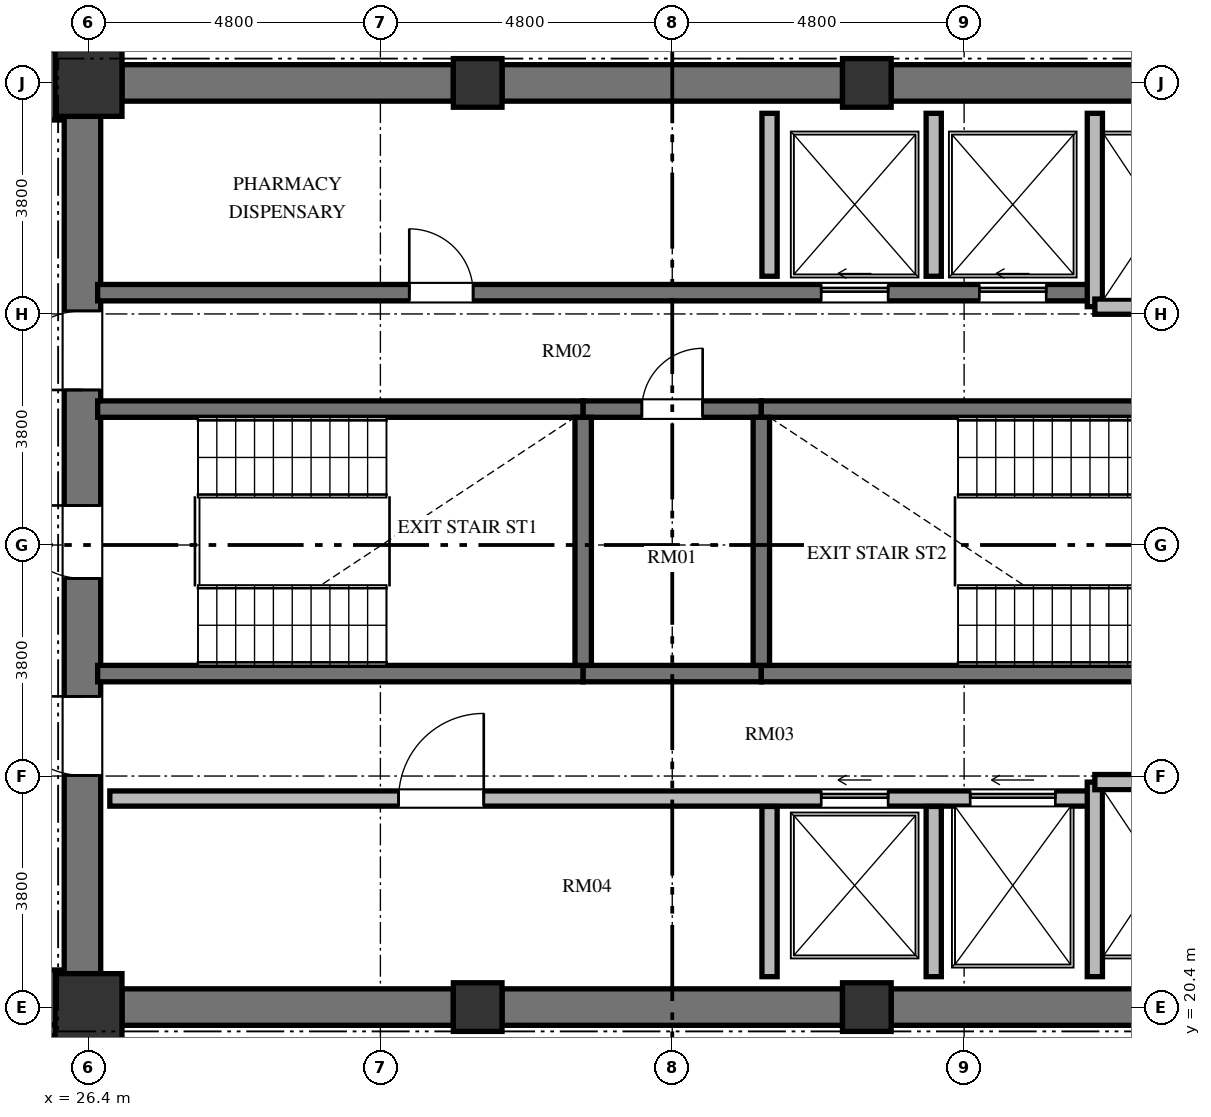
"""IFC4 building model, lengths in metres.
Left out: names, types, materials, properties, quantities, classifications, styles, units other than length and angle.
Written with IfcOpenShell. Run it as: python <this file> out.ifc"""

import sys

from ifc_helpers import new_model, si_unit, direction, frame, frame_2d, origin, origin_2d, place, context, subcontext, project, spatial, rectangle, extrude, element, fill, save


model = new_model("IFC4")
c1 = context("Model", 3, precision=1e-05, world=origin(), true_north=direction((0.0, 1.0)))
c2 = subcontext(c1, "Body", "Model", "MODEL_VIEW")
j1 = project(units=[si_unit("LENGTHUNIT", "METRE"), si_unit("PLANEANGLEUNIT", "RADIAN")], contexts=[c1])
p1 = place(None, origin())
s1 = spatial("IfcSite", under=j1, at=p1, CompositionType="ELEMENT")
p2 = place(p1, origin())
s2 = spatial("IfcBuilding", under=s1, at=p2, CompositionType="ELEMENT")
p3 = place(p2, frame((0.0, 0.0, 194.832)))
s3 = spatial("IfcBuildingStorey", under=s2, at=p3, CompositionType="ELEMENT", Elevation=194.832)
p4 = place(p3, frame((26.4, 20.4, 0.0), z_axis=(0.0, 0.0, 1.0), x_axis=(1.0, 0.0, 0.0)))
e1 = element("IfcColumn", 1, at=p4, inside=s3, PredefinedType="COLUMN", context=c2, shape_type="SweptSolid", body=[
    extrude(rectangle(XDim=1.1, YDim=1.1, at=origin_2d()), origin(), (0.0, 0.0, 1.0), 3.648),
])
for number, where, z_axis, x_axis in (
    (2, (32.8, 20.4, 0.0), (0.0, 0.0, 1.0), (1.0, 0.0, 0.0)),
    (3, (39.2, 20.4, 0.0), (0.0, 0.0, 1.0), (1.0, 0.0, 0.0)),
    (4, (39.2, 35.6, 0.0), (0.0, 0.0, 1.0), (1.0, 0.0, 0.0)),
    (5, (32.8, 35.6, 0.0), (0.0, 0.0, 1.0), (1.0, 0.0, 0.0)),
):
    element("IfcColumn", number, at=place(p3, frame(where, z_axis=z_axis, x_axis=x_axis)), inside=s3, PredefinedType="COLUMN", context=c2, shape_type="SweptSolid", body=[
        extrude(rectangle(XDim=0.8, YDim=0.8, at=origin_2d()), origin(), (0.0, 0.0, 1.0), 3.648),
    ])
p5 = place(p3, frame((26.4, 35.6, 0.0), z_axis=(0.0, 0.0, 1.0), x_axis=(1.0, 0.0, 0.0)))
e6 = element("IfcColumn", 6, at=p5, inside=s3, PredefinedType="COLUMN", context=c2, shape_type="SweptSolid", body=[
    extrude(rectangle(XDim=1.1, YDim=1.1, at=origin_2d()), origin(), (0.0, 0.0, 1.0), 3.648),
])
p6 = place(p3, frame((26.3, 20.95, 0.0), z_axis=(0.0, 0.0, 1.0), x_axis=(0.0, 1.0, 0.0)))
e7 = element("IfcWall", 7, at=p6, inside=s3, PredefinedType="SHEAR", context=c2, shape_type="SweptSolid", body=[
    extrude(rectangle(XDim=14.1, YDim=0.6, at=frame_2d((7.05, 0.0))), origin(), (0.0, 0.0, 1.0), 3.648),
])
p7 = place(p6, frame((6.5, 0.0, 0.0)))
e8 = element("IfcOpeningElement", 8, at=p7, cuts=e7, PredefinedType="OPENING", context=c2, shape_type="SweptSolid", body=[
    extrude(rectangle(XDim=1.2, YDim=2.15, at=frame_2d((0.6, 1.075))), frame((0.0, 0.31, 0.0), z_axis=(0.0, -1.0, 0.0), x_axis=(1.0, 0.0, 0.0)), (0.0, 0.0, 1.0), 0.62),
])
p8 = place(p6, frame((9.6, 0.0, 0.0)))
e9 = element("IfcOpeningElement", 9, at=p8, cuts=e7, PredefinedType="OPENING", context=c2, shape_type="SweptSolid", body=[
    extrude(rectangle(XDim=1.3, YDim=2.2, at=frame_2d((0.65, 1.1))), frame((0.0, 0.31, 0.0), z_axis=(0.0, -1.0, 0.0), x_axis=(1.0, 0.0, 0.0)), (0.0, 0.0, 1.0), 0.62),
])
p9 = place(p6, frame((3.26, 0.0, 0.0)))
e10 = element("IfcOpeningElement", 10, at=p9, cuts=e7, PredefinedType="OPENING", context=c2, shape_type="SweptSolid", body=[
    extrude(rectangle(XDim=1.3, YDim=2.2, at=frame_2d((0.65, 1.1))), frame((0.0, 0.31, 0.0), z_axis=(0.0, -1.0, 0.0), x_axis=(1.0, 0.0, 0.0)), (0.0, 0.0, 1.0), 0.62),
])
for number, where, z_axis, x_axis in (
    (11, (26.95, 20.4, 0.0), (0.0, 0.0, 1.0), (1.0, 0.0, 0.0)),
    (12, (26.95, 35.6, 0.0), (0.0, 0.0, 1.0), (1.0, 0.0, 0.0)),
):
    element("IfcWall", number, at=place(p3, frame(where, z_axis=z_axis, x_axis=x_axis)), inside=s3, PredefinedType="SHEAR", context=c2, shape_type="SweptSolid", body=[
        extrude(rectangle(XDim=5.45, YDim=0.6, at=frame_2d((2.725, 0.0))), origin(), (0.0, 0.0, 1.0), 3.648),
    ])
for number, where, z_axis, x_axis in (
    (13, (33.2, 20.4, 0.0), (0.0, 0.0, 1.0), (1.0, 0.0, 0.0)),
    (14, (33.2, 35.6, 0.0), (0.0, 0.0, 1.0), (1.0, 0.0, 0.0)),
):
    element("IfcWall", number, at=place(p3, frame(where, z_axis=z_axis, x_axis=x_axis)), inside=s3, PredefinedType="SHEAR", context=c2, shape_type="SweptSolid", body=[
        extrude(rectangle(XDim=5.6, YDim=0.6, at=frame_2d((2.8, 0.0))), origin(), (0.0, 0.0, 1.0), 3.648),
    ])
for number, where, z_axis, x_axis in (
    (15, (39.6, 20.4, 0.0), (0.0, 0.0, 1.0), (1.0, 0.0, 0.0)),
    (16, (39.6, 35.6, 0.0), (0.0, 0.0, 1.0), (1.0, 0.0, 0.0)),
):
    element("IfcWall", number, at=place(p3, frame(where, z_axis=z_axis, x_axis=x_axis)), inside=s3, PredefinedType="SHEAR", context=c2, shape_type="SweptSolid", body=[
        extrude(rectangle(XDim=5.45, YDim=0.6, at=frame_2d((2.725, 0.0))), origin(), (0.0, 0.0, 1.0), 3.648),
    ])
p10 = place(p3, frame((26.55, 30.235, 0.0), z_axis=(0.0, 0.0, 1.0), x_axis=(1.0, 0.0, 0.0)))
e17 = element("IfcWall", 17, at=p10, inside=s3, PredefinedType="SHEAR", context=c2, shape_type="SweptSolid", body=[
    extrude(rectangle(XDim=7.985, YDim=0.27, at=frame_2d((3.992, 0.0))), origin(), (0.0, 0.0, 1.0), 3.648),
])
p11 = place(p3, frame((34.535, 30.235, 0.0), z_axis=(0.0, 0.0, 1.0), x_axis=(1.0, 0.0, 0.0)))
e18 = element("IfcWall", 18, at=p11, inside=s3, PredefinedType="SHEAR", context=c2, shape_type="SweptSolid", body=[
    extrude(rectangle(XDim=2.93, YDim=0.27, at=frame_2d((1.465, 0.0))), origin(), (0.0, 0.0, 1.0), 3.648),
])
p12 = place(p11, frame((0.965, 0.0, 0.0)))
e19 = element("IfcOpeningElement", 19, at=p12, cuts=e18, PredefinedType="OPENING", context=c2, shape_type="SweptSolid", body=[
    extrude(rectangle(XDim=1.0, YDim=2.1, at=frame_2d((0.5, 1.05))), frame((0.0, 0.145, 0.0), z_axis=(0.0, -1.0, 0.0), x_axis=(1.0, 0.0, 0.0)), (0.0, 0.0, 1.0), 0.29),
])
p13 = place(p3, frame((37.465, 30.235, 0.0), z_axis=(0.0, 0.0, 1.0), x_axis=(1.0, 0.0, 0.0)))
e20 = element("IfcWall", 20, at=p13, inside=s3, PredefinedType="SHEAR", context=c2, shape_type="SweptSolid", body=[
    extrude(rectangle(XDim=7.985, YDim=0.27, at=frame_2d((3.992, 0.0))), origin(), (0.0, 0.0, 1.0), 3.648),
])
p14 = place(p13, frame((6.455, 0.0, 0.0)))
e21 = element("IfcOpeningElement", 21, at=p14, cuts=e20, PredefinedType="OPENING", context=c2, shape_type="SweptSolid", body=[
    extrude(rectangle(XDim=1.2, YDim=2.15, at=frame_2d((0.6, 1.075))), frame((0.0, 0.145, 0.0), z_axis=(0.0, -1.0, 0.0), x_axis=(1.0, 0.0, 0.0)), (0.0, 0.0, 1.0), 0.29),
])
p15 = place(p3, frame((26.55, 25.885, 0.0), z_axis=(0.0, 0.0, 1.0), x_axis=(1.0, 0.0, 0.0)))
e22 = element("IfcWall", 22, at=p15, inside=s3, PredefinedType="SHEAR", context=c2, shape_type="SweptSolid", body=[
    extrude(rectangle(XDim=7.985, YDim=0.27, at=frame_2d((3.992, 0.0))), origin(), (0.0, 0.0, 1.0), 3.648),
])
p16 = place(p3, frame((34.535, 25.885, 0.0), z_axis=(0.0, 0.0, 1.0), x_axis=(1.0, 0.0, 0.0)))
e23 = element("IfcWall", 23, at=p16, inside=s3, PredefinedType="SHEAR", context=c2, shape_type="SweptSolid", body=[
    extrude(rectangle(XDim=2.93, YDim=0.27, at=frame_2d((1.465, 0.0))), origin(), (0.0, 0.0, 1.0), 3.648),
])
p17 = place(p3, frame((37.465, 25.885, 0.0), z_axis=(0.0, 0.0, 1.0), x_axis=(1.0, 0.0, 0.0)))
e24 = element("IfcWall", 24, at=p17, inside=s3, PredefinedType="SHEAR", context=c2, shape_type="SweptSolid", body=[
    extrude(rectangle(XDim=7.985, YDim=0.27, at=frame_2d((3.992, 0.0))), origin(), (0.0, 0.0, 1.0), 3.648),
])
for number, where, z_axis, x_axis in (
    (25, (34.535, 26.02, 0.0), (0.0, 0.0, 1.0), (0.0, 1.0, 0.0)),
    (26, (37.465, 26.02, 0.0), (0.0, 0.0, 1.0), (0.0, 1.0, 0.0)),
):
    element("IfcWall", number, at=place(p3, frame(where, z_axis=z_axis, x_axis=x_axis)), inside=s3, PredefinedType="SHEAR", context=c2, shape_type="SweptSolid", body=[
        extrude(rectangle(XDim=4.08, YDim=0.27, at=frame_2d((2.04, 0.0))), origin(), (0.0, 0.0, 1.0), 3.648),
    ])
p18 = place(p3, frame((26.55, 32.15, 0.0), z_axis=(0.0, 0.0, 1.0), x_axis=(1.0, 0.0, 0.0)))
e27 = element("IfcWall", 27, at=p18, inside=s3, PredefinedType="SHEAR", context=c2, shape_type="SweptSolid", body=[
    extrude(rectangle(XDim=16.4, YDim=0.27, at=frame_2d((8.2, 0.0))), origin(), (0.0, 0.0, 1.0), 3.648),
])
p19 = place(p18, frame((5.125, 0.0, 0.0)))
e28 = element("IfcOpeningElement", 28, at=p19, cuts=e27, PredefinedType="OPENING", context=c2, shape_type="SweptSolid", body=[
    extrude(rectangle(XDim=1.05, YDim=2.15, at=frame_2d((0.525, 1.075))), frame((0.0, 0.145, 0.0), z_axis=(0.0, -1.0, 0.0), x_axis=(1.0, 0.0, 0.0)), (0.0, 0.0, 1.0), 0.29),
])
p20 = place(p18, frame((11.9, 0.0, 0.0)))
e29 = element("IfcOpeningElement", 29, at=p20, cuts=e27, PredefinedType="OPENING", context=c2, shape_type="SweptSolid", body=[
    extrude(rectangle(XDim=1.1, YDim=2.2, at=frame_2d((0.55, 1.1))), frame((0.0, 0.145, 0.0), z_axis=(0.0, -1.0, 0.0), x_axis=(1.0, 0.0, 0.0)), (0.0, 0.0, 1.0), 0.29),
])
p21 = place(p18, frame((14.5, 0.0, 0.0)))
e30 = element("IfcOpeningElement", 30, at=p21, cuts=e27, PredefinedType="OPENING", context=c2, shape_type="SweptSolid", body=[
    extrude(rectangle(XDim=1.1, YDim=2.2, at=frame_2d((0.55, 1.1))), frame((0.0, 0.145, 0.0), z_axis=(0.0, -1.0, 0.0), x_axis=(1.0, 0.0, 0.0)), (0.0, 0.0, 1.0), 0.29),
])
p22 = place(p3, frame((26.75, 23.83, 0.0), z_axis=(0.0, 0.0, 1.0), x_axis=(1.0, 0.0, 0.0)))
e31 = element("IfcWall", 31, at=p22, inside=s3, PredefinedType="SOLIDWALL", context=c2, shape_type="SweptSolid", body=[
    extrude(rectangle(XDim=16.2, YDim=0.25, at=frame_2d((8.1, 0.0))), origin(), (0.0, 0.0, 1.0), 3.448),
])
p23 = place(p22, frame((4.75, 0.0, 0.0)))
e32 = element("IfcOpeningElement", 32, at=p23, cuts=e31, PredefinedType="OPENING", context=c2, shape_type="SweptSolid", body=[
    extrude(rectangle(XDim=1.4, YDim=2.2, at=frame_2d((0.7, 1.1))), frame((0.0, 0.135, 0.0), z_axis=(0.0, -1.0, 0.0), x_axis=(1.0, 0.0, 0.0)), (0.0, 0.0, 1.0), 0.27),
])
p24 = place(p22, frame((11.7, 0.0, 0.0)))
e33 = element("IfcOpeningElement", 33, at=p24, cuts=e31, PredefinedType="OPENING", context=c2, shape_type="SweptSolid", body=[
    extrude(rectangle(XDim=1.1, YDim=2.2, at=frame_2d((0.55, 1.1))), frame((0.0, 0.135, 0.0), z_axis=(0.0, -1.0, 0.0), x_axis=(1.0, 0.0, 0.0)), (0.0, 0.0, 1.0), 0.27),
])
p25 = place(p22, frame((14.15, 0.0, 0.0)))
e34 = element("IfcOpeningElement", 34, at=p25, cuts=e31, PredefinedType="OPENING", context=c2, shape_type="SweptSolid", body=[
    extrude(rectangle(XDim=1.4, YDim=2.3, at=frame_2d((0.7, 1.15))), frame((0.0, 0.135, 0.0), z_axis=(0.0, -1.0, 0.0), x_axis=(1.0, 0.0, 0.0)), (0.0, 0.0, 1.0), 0.27),
])
p26 = place(p3, frame((42.95, 31.92, 0.0), z_axis=(0.0, 0.0, 1.0), x_axis=(0.0, 1.0, 0.0)))
e35 = element("IfcWall", 35, at=p26, inside=s3, PredefinedType="SOLIDWALL", context=c2, shape_type="SweptSolid", body=[
    extrude(rectangle(XDim=3.18, YDim=0.25, at=frame_2d((1.59, 0.0))), origin(), (0.0, 0.0, 1.0), 3.448),
])
p27 = place(p3, frame((42.95, 31.92, 0.0), z_axis=(0.0, 0.0, 1.0), x_axis=(1.0, 0.0, 0.0)))
e36 = element("IfcWall", 36, at=p27, inside=s3, PredefinedType="SOLIDWALL", context=c2, shape_type="SweptSolid", body=[
    extrude(rectangle(XDim=2.3, YDim=0.25, at=frame_2d((1.15, 0.0))), origin(), (0.0, 0.0, 1.0), 3.448),
])
p28 = place(p3, frame((42.95, 20.9, 0.0), z_axis=(0.0, 0.0, 1.0), x_axis=(0.0, 1.0, 0.0)))
e37 = element("IfcWall", 37, at=p28, inside=s3, PredefinedType="SOLIDWALL", context=c2, shape_type="SweptSolid", body=[
    extrude(rectangle(XDim=3.2, YDim=0.25, at=frame_2d((1.6, 0.0))), origin(), (0.0, 0.0, 1.0), 3.448),
])
p29 = place(p3, frame((42.95, 24.1, 0.0), z_axis=(0.0, 0.0, 1.0), x_axis=(1.0, 0.0, 0.0)))
e38 = element("IfcWall", 38, at=p29, inside=s3, PredefinedType="SOLIDWALL", context=c2, shape_type="SweptSolid", body=[
    extrude(rectangle(XDim=2.3, YDim=0.25, at=frame_2d((1.15, 0.0))), origin(), (0.0, 0.0, 1.0), 3.448),
])
p30 = place(p3, frame((37.6, 32.42, 0.0), z_axis=(0.0, 0.0, 1.0), x_axis=(0.0, 1.0, 0.0)))
e39 = element("IfcWall", 39, at=p30, inside=s3, PredefinedType="SOLIDWALL", context=c2, shape_type="SweptSolid", body=[
    extrude(rectangle(XDim=2.68, YDim=0.25, at=frame_2d((1.34, 0.0))), origin(), (0.0, 0.0, 1.0), 3.448),
])
p31 = place(p3, frame((37.6, 20.9, 0.0), z_axis=(0.0, 0.0, 1.0), x_axis=(0.0, 1.0, 0.0)))
e40 = element("IfcWall", 40, at=p31, inside=s3, PredefinedType="SOLIDWALL", context=c2, shape_type="SweptSolid", body=[
    extrude(rectangle(XDim=2.8, YDim=0.25, at=frame_2d((1.4, 0.0))), origin(), (0.0, 0.0, 1.0), 3.448),
])
p32 = place(p3, frame((40.3, 32.42, 0.0), z_axis=(0.0, 0.0, 1.0), x_axis=(0.0, 1.0, 0.0)))
e41 = element("IfcWall", 41, at=p32, inside=s3, PredefinedType="SOLIDWALL", context=c2, shape_type="SweptSolid", body=[
    extrude(rectangle(XDim=2.68, YDim=0.25, at=frame_2d((1.34, 0.0))), origin(), (0.0, 0.0, 1.0), 3.448),
])
p33 = place(p3, frame((40.3, 20.9, 0.0), z_axis=(0.0, 0.0, 1.0), x_axis=(0.0, 1.0, 0.0)))
e42 = element("IfcWall", 42, at=p33, inside=s3, PredefinedType="SOLIDWALL", context=c2, shape_type="SweptSolid", body=[
    extrude(rectangle(XDim=2.8, YDim=0.25, at=frame_2d((1.4, 0.0))), origin(), (0.0, 0.0, 1.0), 3.448),
])
p34 = place(p3, frame((25.83, 36.14, 0.0), z_axis=(0.0, 0.0, 1.0), x_axis=(0.0, -1.0, 0.0)))
e43 = element("IfcWall", 43, at=p34, inside=s3, PredefinedType="PARTITIONING", context=c2, shape_type="SweptSolid", body=[
    extrude(rectangle(XDim=1.15, YDim=0.18, at=frame_2d((0.575, 0.0))), origin(), (0.0, 0.0, 1.0), 3.448),
])
p35 = place(p3, frame((25.83, 21.01, 0.0), z_axis=(0.0, 0.0, 1.0), x_axis=(0.0, -1.0, 0.0)))
e44 = element("IfcWall", 44, at=p35, inside=s3, PredefinedType="PARTITIONING", context=c2, shape_type="SweptSolid", body=[
    extrude(rectangle(XDim=1.03, YDim=0.18, at=frame_2d((0.515, 0.0))), origin(), (0.0, 0.0, 1.0), 3.448),
])
p36 = place(p3, frame((25.87, 20.02, 0.0), z_axis=(0.0, 0.0, 1.0), x_axis=(-1.0, 0.0, 0.0)))
e45 = element("IfcWall", 45, at=p36, inside=s3, PredefinedType="PARTITIONING", context=c2, shape_type="SweptSolid", body=[
    extrude(rectangle(XDim=2.56, YDim=0.18, at=frame_2d((1.28, 0.0))), origin(), (0.0, 0.0, 1.0), 3.448),
])
p37 = place(p7, origin())
e46 = element("IfcDoor", 46, at=p37, inside=s3, OperationType="SINGLE_SWING_RIGHT", PredefinedType="DOOR", context=c2, shape_type="SweptSolid", body=[
    extrude(rectangle(XDim=1.2, YDim=2.15, at=frame_2d((0.6, 1.075))), frame((0.0, 0.025, 0.0), z_axis=(0.0, -1.0, 0.0), x_axis=(1.0, 0.0, 0.0)), (0.0, 0.0, 1.0), 0.05),
])
fill(e8, e46)
p38 = place(p12, origin())
e47 = element("IfcDoor", 47, at=p38, inside=s3, OperationType="SINGLE_SWING_RIGHT", PredefinedType="DOOR", context=c2, shape_type="SweptSolid", body=[
    extrude(rectangle(XDim=1.0, YDim=2.1, at=frame_2d((0.5, 1.05))), frame((0.0, 0.025, 0.0), z_axis=(0.0, -1.0, 0.0), x_axis=(1.0, 0.0, 0.0)), (0.0, 0.0, 1.0), 0.05),
])
fill(e19, e47)
p39 = place(p8, origin())
e48 = element("IfcDoor", 48, at=p39, inside=s3, OperationType="SINGLE_SWING_LEFT", PredefinedType="DOOR", context=c2, shape_type="SweptSolid", body=[
    extrude(rectangle(XDim=1.3, YDim=2.2, at=frame_2d((0.65, 1.1))), frame((0.0, 0.025, 0.0), z_axis=(0.0, -1.0, 0.0), x_axis=(1.0, 0.0, 0.0)), (0.0, 0.0, 1.0), 0.05),
])
fill(e9, e48)
p40 = place(p9, origin())
e49 = element("IfcDoor", 49, at=p40, inside=s3, OperationType="SINGLE_SWING_RIGHT", PredefinedType="DOOR", context=c2, shape_type="SweptSolid", body=[
    extrude(rectangle(XDim=1.3, YDim=2.2, at=frame_2d((0.65, 1.1))), frame((0.0, 0.025, 0.0), z_axis=(0.0, -1.0, 0.0), x_axis=(1.0, 0.0, 0.0)), (0.0, 0.0, 1.0), 0.05),
])
fill(e10, e49)
p41 = place(p19, origin())
e50 = element("IfcDoor", 50, at=p41, inside=s3, OperationType="SINGLE_SWING_LEFT", PredefinedType="DOOR", context=c2, shape_type="SweptSolid", body=[
    extrude(rectangle(XDim=1.05, YDim=2.15, at=frame_2d((0.525, 1.075))), frame((0.0, 0.025, 0.0), z_axis=(0.0, -1.0, 0.0), x_axis=(1.0, 0.0, 0.0)), (0.0, 0.0, 1.0), 0.05),
])
fill(e28, e50)
p42 = place(p23, origin())
e51 = element("IfcDoor", 51, at=p42, inside=s3, OperationType="SINGLE_SWING_RIGHT", PredefinedType="DOOR", context=c2, shape_type="SweptSolid", body=[
    extrude(rectangle(XDim=1.4, YDim=2.2, at=frame_2d((0.7, 1.1))), frame((0.0, 0.025, 0.0), z_axis=(0.0, -1.0, 0.0), x_axis=(1.0, 0.0, 0.0)), (0.0, 0.0, 1.0), 0.05),
])
fill(e32, e51)
p43 = place(p20, origin())
e52 = element("IfcDoor", 52, at=p43, inside=s3, OperationType="SLIDING_TO_LEFT", PredefinedType="DOOR", context=c2, shape_type="SweptSolid", body=[
    extrude(rectangle(XDim=1.1, YDim=2.2, at=frame_2d((0.55, 1.1))), frame((0.0, 0.025, 0.0), z_axis=(0.0, -1.0, 0.0), x_axis=(1.0, 0.0, 0.0)), (0.0, 0.0, 1.0), 0.05),
])
fill(e29, e52)
p44 = place(p21, origin())
e53 = element("IfcDoor", 53, at=p44, inside=s3, OperationType="SLIDING_TO_LEFT", PredefinedType="DOOR", context=c2, shape_type="SweptSolid", body=[
    extrude(rectangle(XDim=1.1, YDim=2.2, at=frame_2d((0.55, 1.1))), frame((0.0, 0.025, 0.0), z_axis=(0.0, -1.0, 0.0), x_axis=(1.0, 0.0, 0.0)), (0.0, 0.0, 1.0), 0.05),
])
fill(e30, e53)
p45 = place(p24, origin())
e54 = element("IfcDoor", 54, at=p45, inside=s3, OperationType="SLIDING_TO_LEFT", PredefinedType="DOOR", context=c2, shape_type="SweptSolid", body=[
    extrude(rectangle(XDim=1.1, YDim=2.2, at=frame_2d((0.55, 1.1))), frame((0.0, 0.025, 0.0), z_axis=(0.0, -1.0, 0.0), x_axis=(1.0, 0.0, 0.0)), (0.0, 0.0, 1.0), 0.05),
])
fill(e33, e54)
p46 = place(p25, origin())
e55 = element("IfcDoor", 55, at=p46, inside=s3, OperationType="SLIDING_TO_LEFT", PredefinedType="DOOR", context=c2, shape_type="SweptSolid", body=[
    extrude(rectangle(XDim=1.4, YDim=2.3, at=frame_2d((0.7, 1.15))), frame((0.0, 0.025, 0.0), z_axis=(0.0, -1.0, 0.0), x_axis=(1.0, 0.0, 0.0)), (0.0, 0.0, 1.0), 0.05),
])
fill(e34, e55)
save(model, sys.argv[1])
